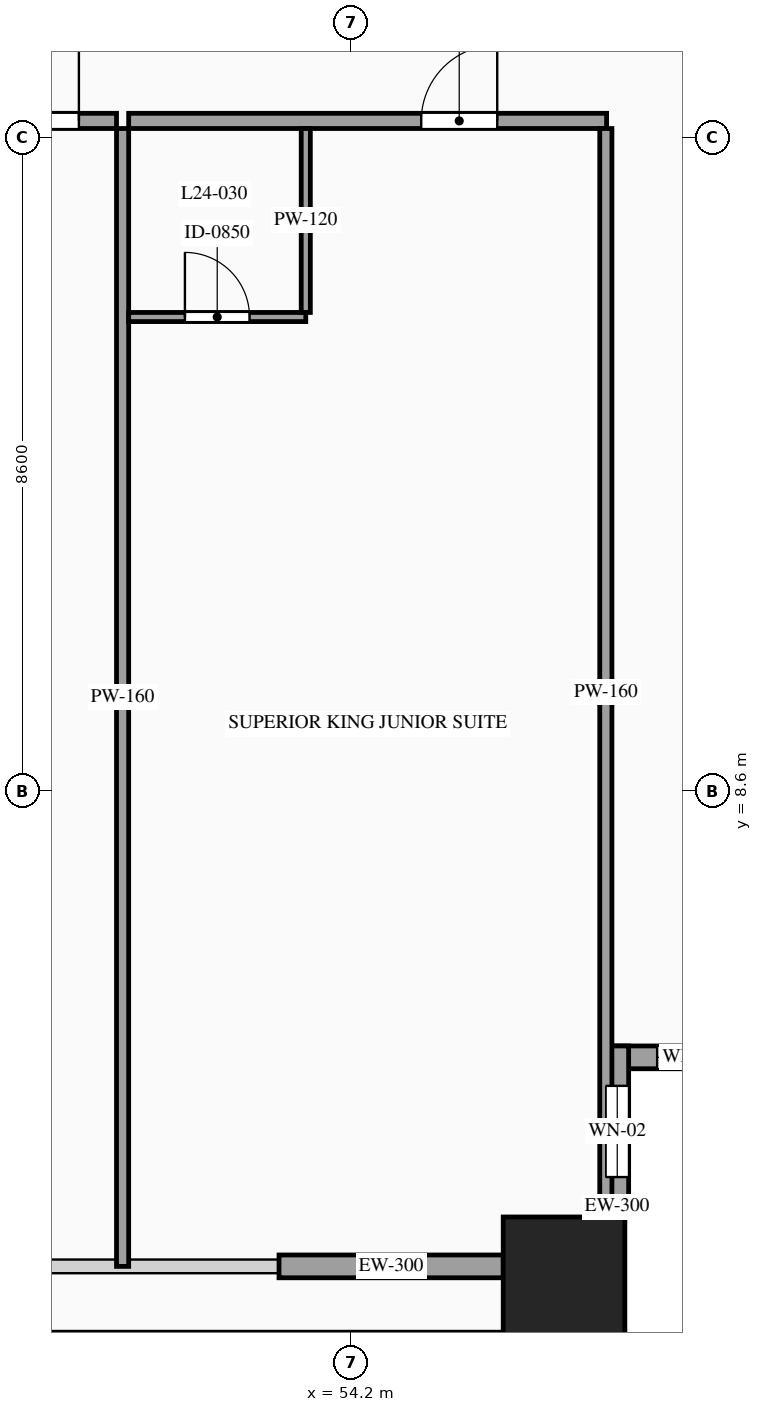
"""IFC4 building model, lengths in metres.
Left out: names, types, materials, properties, quantities, classifications, styles, units other than length and angle.
Written with IfcOpenShell. Run it as: python <this file> out.ifc"""

import sys

from ifc_helpers import new_model, si_unit, direction, frame, frame_2d, origin, origin_2d, place, context, subcontext, project, spatial, rectangle, hollow_rectangle, extrude, source, transform, mapped, element, fill, save


model = new_model("IFC4")
c1 = context("Model", 3, precision=1e-05, world=origin(), true_north=direction((0.0, 1.0)))
c2 = subcontext(c1, "Body", "Model", "MODEL_VIEW")
j1 = project(units=[si_unit("LENGTHUNIT", "METRE"), si_unit("PLANEANGLEUNIT", "RADIAN")], contexts=[c1])
p1 = place(None, origin())
s1 = spatial("IfcSite", under=j1, at=p1, CompositionType="ELEMENT")
p2 = place(p1, origin())
s2 = spatial("IfcBuilding", under=s1, at=p2, CompositionType="ELEMENT")
p3 = place(p2, frame((0.0, 0.0, 93.8)))
s3 = spatial("IfcBuildingStorey", under=s2, at=p3, CompositionType="ELEMENT", Elevation=93.8)
m1 = source(origin(), c2, "Body", "SweptSolid", [
    extrude(hollow_rectangle(XDim=1.6, YDim=1.6, WallThickness=0.07, at=origin_2d()), origin(), (0.0, 0.0, 1.0), 3.6),
])
p4 = place(p3, frame((57.0, 2.2, 0.0), z_axis=(0.0, 0.0, 1.0), x_axis=(1.0, 0.0, 0.0)))
e1 = element("IfcColumn", 1, at=p4, inside=s3, PredefinedType="COLUMN", context=c2, shape_type="MappedRepresentation", body=[
    mapped(m1, transform((0.0, 0.0, 0.0), scale=1.0)),
])
p5 = place(p3, frame((57.55, 5.1, 0.0), z_axis=(0.0, 0.0, 1.0), x_axis=(1.0, 0.0, 0.0)))
e2 = element("IfcWall", 2, at=p5, inside=s3, PredefinedType="SOLIDWALL", context=c2, shape_type="SweptSolid", body=[
    extrude(rectangle(XDim=2.25, YDim=0.3, at=frame_2d((1.125, 0.0))), origin(), (0.0, 0.0, 1.0), 3.38),
])
p6 = place(p5, frame((0.675, 0.0, 0.85)))
e3 = element("IfcOpeningElement", 3, at=p6, cuts=e2, PredefinedType="OPENING", context=c2, shape_type="SweptSolid", body=[
    extrude(rectangle(XDim=0.9, YDim=1.5, at=frame_2d((0.45, 0.75))), frame((0.0, 0.165, 0.0), z_axis=(0.0, -1.0, 0.0), x_axis=(1.0, 0.0, 0.0)), (0.0, 0.0, 1.0), 0.33),
])
p7 = place(p3, frame((57.7, 3.0, 0.0), z_axis=(0.0, 0.0, 1.0), x_axis=(0.0, 1.0, 0.0)))
e4 = element("IfcWall", 4, at=p7, inside=s3, PredefinedType="SOLIDWALL", context=c2, shape_type="SweptSolid", body=[
    extrude(rectangle(XDim=2.25, YDim=0.3, at=frame_2d((1.125, 0.0))), origin(), (0.0, 0.0, 1.0), 3.38),
])
p8 = place(p7, frame((0.525, 0.0, 0.85)))
e5 = element("IfcOpeningElement", 5, at=p8, cuts=e4, PredefinedType="OPENING", context=c2, shape_type="SweptSolid", body=[
    extrude(rectangle(XDim=1.2, YDim=2.1, at=frame_2d((0.6, 1.05))), frame((0.0, 0.165, 0.0), z_axis=(0.0, -1.0, 0.0), x_axis=(1.0, 0.0, 0.0)), (0.0, 0.0, 1.0), 0.33),
])
m2 = source(origin(), c2, "Body", "SweptSolid", [
    extrude(rectangle(XDim=2.95, YDim=0.3, at=frame_2d((1.475, 0.0))), origin(), (0.0, 0.0, 1.0), 2.775),
])
p9 = place(p3, frame((53.25, 2.35, 0.0), z_axis=(0.0, 0.0, 1.0), x_axis=(1.0, 0.0, 0.0)))
e6 = element("IfcWall", 6, at=p9, inside=s3, PredefinedType="SOLIDWALL", context=c2, shape_type="MappedRepresentation", body=[
    mapped(m2, transform((0.0, 0.0, 0.0), scale=1.0)),
])
p10 = place(p3, frame((46.714, 17.42, 0.0), z_axis=(0.0, 0.0, 1.0), x_axis=(1.0, 0.0, 0.0)))
e7 = element("IfcWall", 7, at=p10, inside=s3, PredefinedType="PARTITIONING", context=c2, shape_type="SweptSolid", body=[
    extrude(rectangle(XDim=4.398, YDim=0.2, at=frame_2d((2.199, 0.0))), origin(), (0.0, 0.0, 1.0), 3.38),
])
p11 = place(p10, frame((2.903, 0.0, 0.0)))
e8 = element("IfcOpeningElement", 8, at=p11, cuts=e7, PredefinedType="OPENING", context=c2, shape_type="SweptSolid", body=[
    extrude(rectangle(XDim=1.0, YDim=2.2, at=frame_2d((0.5, 1.1))), frame((0.0, 0.115, 0.0), z_axis=(0.0, -1.0, 0.0), x_axis=(1.0, 0.0, 0.0)), (0.0, 0.0, 1.0), 0.23),
])
m3 = source(origin(), c2, "Body", "SweptSolid", [
    extrude(rectangle(XDim=14.97, YDim=0.16, at=frame_2d((7.485, 0.0))), origin(), (0.0, 0.0, 1.0), 3.38),
])
p12 = place(p3, frame((51.192, 2.35, 0.0), z_axis=(0.0, 0.0, 1.0), x_axis=(0.0, 1.0, 0.0)))
e9 = element("IfcWall", 9, at=p12, inside=s3, PredefinedType="PARTITIONING", context=c2, shape_type="MappedRepresentation", body=[
    mapped(m3, transform((0.0, 0.0, 0.0), scale=1.0)),
])
p13 = place(p3, frame((51.272, 17.42, 0.0), z_axis=(0.0, 0.0, 1.0), x_axis=(1.0, 0.0, 0.0)))
e10 = element("IfcWall", 10, at=p13, inside=s3, PredefinedType="PARTITIONING", context=c2, shape_type="SweptSolid", body=[
    extrude(rectangle(XDim=6.288, YDim=0.2, at=frame_2d((3.144, 0.0))), origin(), (0.0, 0.0, 1.0), 3.38),
])
p14 = place(p13, frame((3.849, 0.0, 0.0)))
e11 = element("IfcOpeningElement", 11, at=p14, cuts=e10, PredefinedType="OPENING", context=c2, shape_type="SweptSolid", body=[
    extrude(rectangle(XDim=1.0, YDim=2.2, at=frame_2d((0.5, 1.1))), frame((0.0, 0.115, 0.0), z_axis=(0.0, -1.0, 0.0), x_axis=(1.0, 0.0, 0.0)), (0.0, 0.0, 1.0), 0.23),
])
m4 = source(origin(), c2, "Body", "SweptSolid", [
    extrude(rectangle(XDim=14.82, YDim=0.16, at=frame_2d((7.41, 0.0))), origin(), (0.0, 0.0, 1.0), 3.38),
])
p15 = place(p3, frame((57.55, 2.5, 0.0), z_axis=(0.0, 0.0, 1.0), x_axis=(0.0, 1.0, 0.0)))
e12 = element("IfcWall", 12, at=p15, inside=s3, PredefinedType="PARTITIONING", context=c2, shape_type="MappedRepresentation", body=[
    mapped(m4, transform((0.0, 0.0, 0.0), scale=1.0)),
])
p16 = place(p3, frame((51.272, 14.84, 0.0), z_axis=(0.0, 0.0, 1.0), x_axis=(1.0, 0.0, 0.0)))
e13 = element("IfcWall", 13, at=p16, inside=s3, PredefinedType="PARTITIONING", context=c2, shape_type="SweptSolid", body=[
    extrude(rectangle(XDim=2.33, YDim=0.12, at=frame_2d((1.165, 0.0))), origin(), (0.0, 0.0, 1.0), 3.38),
])
p17 = place(p16, frame((0.74, 0.0, 0.0)))
e14 = element("IfcOpeningElement", 14, at=p17, cuts=e13, PredefinedType="OPENING", context=c2, shape_type="SweptSolid", body=[
    extrude(rectangle(XDim=0.85, YDim=2.1, at=frame_2d((0.425, 1.05))), frame((0.0, 0.075, 0.0), z_axis=(0.0, -1.0, 0.0), x_axis=(1.0, 0.0, 0.0)), (0.0, 0.0, 1.0), 0.15),
])
m5 = source(origin(), c2, "Body", "SweptSolid", [
    extrude(rectangle(XDim=2.42, YDim=0.12, at=frame_2d((1.21, 0.0))), origin(), (0.0, 0.0, 1.0), 3.38),
])
p18 = place(p3, frame((53.602, 14.9, 0.0), z_axis=(0.0, 0.0, 1.0), x_axis=(0.0, 1.0, 0.0)))
e15 = element("IfcWall", 15, at=p18, inside=s3, PredefinedType="PARTITIONING", context=c2, shape_type="MappedRepresentation", body=[
    mapped(m5, transform((0.0, 0.0, 0.0), scale=1.0)),
])
m6 = source(origin(), c2, "Body", "SweptSolid", [
    extrude(rectangle(XDim=0.9, YDim=1.5, at=frame_2d((0.45, 0.75))), frame((0.0, 0.03, 0.0), z_axis=(0.0, -1.0, 0.0), x_axis=(1.0, 0.0, 0.0)), (0.0, 0.0, 1.0), 0.06),
])
p19 = place(p6, origin())
e16 = element("IfcWindow", 16, at=p19, inside=s3, PartitioningType="SINGLE_PANEL", PredefinedType="WINDOW", context=c2, shape_type="MappedRepresentation", body=[
    mapped(m6, transform((0.0, 0.0, 0.0), scale=1.0)),
])
fill(e3, e16)
m7 = source(origin(), c2, "Body", "SweptSolid", [
    extrude(rectangle(XDim=1.2, YDim=2.1, at=frame_2d((0.6, 1.05))), frame((0.0, 0.03, 0.0), z_axis=(0.0, -1.0, 0.0), x_axis=(1.0, 0.0, 0.0)), (0.0, 0.0, 1.0), 0.06),
])
p20 = place(p8, origin())
e17 = element("IfcWindow", 17, at=p20, inside=s3, PartitioningType="SINGLE_PANEL", PredefinedType="WINDOW", context=c2, shape_type="MappedRepresentation", body=[
    mapped(m7, transform((0.0, 0.0, 0.0), scale=1.0)),
])
fill(e5, e17)
m8 = source(origin(), c2, "Body", "SweptSolid", [
    extrude(rectangle(XDim=1.0, YDim=2.2, at=frame_2d((0.5, 1.1))), frame((0.0, 0.025, 0.0), z_axis=(0.0, -1.0, 0.0), x_axis=(1.0, 0.0, 0.0)), (0.0, 0.0, 1.0), 0.05),
])
p21 = place(p11, origin())
e18 = element("IfcDoor", 18, at=p21, inside=s3, OperationType="SINGLE_SWING_RIGHT", PredefinedType="DOOR", context=c2, shape_type="MappedRepresentation", body=[
    mapped(m8, transform((0.0, 0.0, 0.0), scale=1.0)),
])
fill(e8, e18)
p22 = place(p14, origin())
e19 = element("IfcDoor", 19, at=p22, inside=s3, OperationType="SINGLE_SWING_RIGHT", PredefinedType="DOOR", context=c2, shape_type="MappedRepresentation", body=[
    mapped(m8, transform((0.0, 0.0, 0.0), scale=1.0)),
])
fill(e11, e19)
m9 = source(origin(), c2, "Body", "SweptSolid", [
    extrude(rectangle(XDim=0.85, YDim=2.1, at=frame_2d((0.425, 1.05))), frame((0.0, 0.025, 0.0), z_axis=(0.0, -1.0, 0.0), x_axis=(1.0, 0.0, 0.0)), (0.0, 0.0, 1.0), 0.05),
])
p23 = place(p17, origin())
e20 = element("IfcDoor", 20, at=p23, inside=s3, OperationType="SINGLE_SWING_LEFT", PredefinedType="DOOR", context=c2, shape_type="MappedRepresentation", body=[
    mapped(m9, transform((0.0, 0.0, 0.0), scale=1.0)),
])
fill(e14, e20)
save(model, sys.argv[1])
